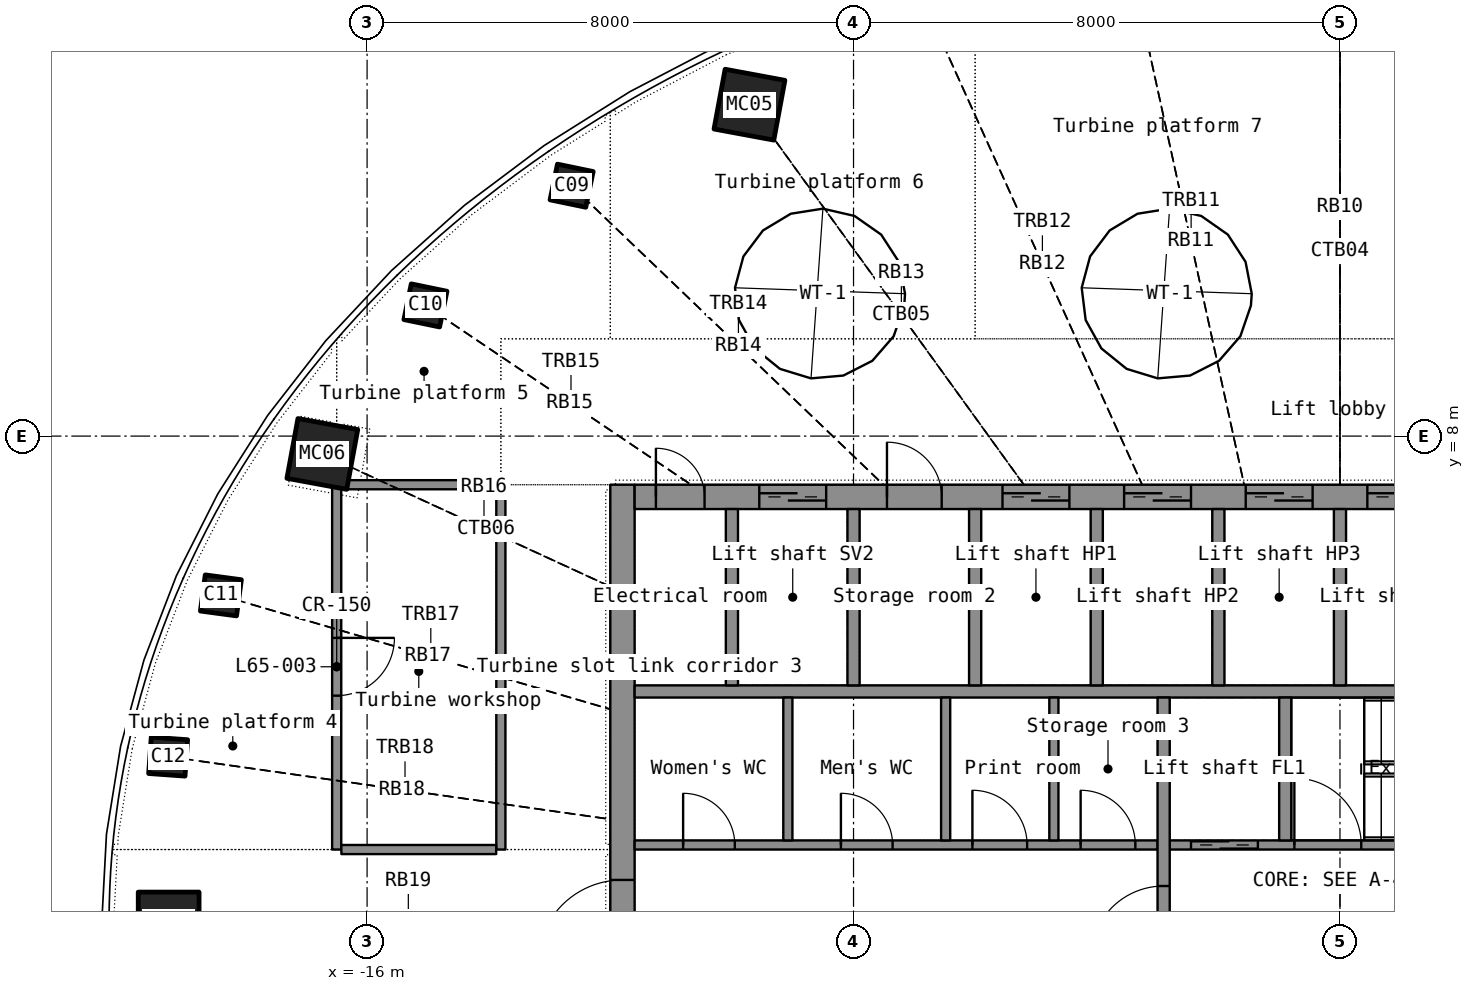
"""IFC4 building model, lengths in metres.
Left out: names, types, materials, properties, quantities, classifications, styles, units other than length and angle.
Written with IfcOpenShell. Run it as: python <this file> out.ifc"""

import sys

from ifc_helpers import new_model, si_unit, direction, frame, frame_2d, origin, origin_2d, place, context, subcontext, project, spatial, rectangle, hollow_rectangle, extrude, element, fill, save


model = new_model("IFC4")
c1 = context("Model", 3, precision=1e-05, world=origin(), true_north=direction((0.0, 1.0)))
c2 = subcontext(c1, "Body", "Model", "MODEL_VIEW")
j1 = project(units=[si_unit("LENGTHUNIT", "METRE"), si_unit("PLANEANGLEUNIT", "RADIAN")], contexts=[c1])
p1 = place(None, origin())
s1 = spatial("IfcSite", under=j1, at=p1, CompositionType="ELEMENT")
p2 = place(p1, origin())
s2 = spatial("IfcBuilding", under=s1, at=p2, CompositionType="ELEMENT")
p3 = place(p2, frame((0.0, 0.0, 265.2)))
s3 = spatial("IfcBuildingStorey", under=s2, at=p3, CompositionType="ELEMENT", Elevation=265.2)
p4 = place(p3, frame((-9.711, 13.451, 0.0), z_axis=(0.017279668, -0.02453449, 0.999549635), x_axis=(0.908911912, 0.416952184, -0.005478454)))
e1 = element("IfcColumn", 1, at=p4, inside=s3, PredefinedType="COLUMN", context=c2, shape_type="SweptSolid", body=[
    extrude(hollow_rectangle(XDim=1.0, YDim=1.0, WallThickness=0.032, at=origin_2d()), origin(), (0.0, 0.0, 1.0), 7.404),
])
p5 = place(p3, frame((-12.636, 12.118, 0.0), z_axis=(0.022225407, -0.021730776, 0.999516786), x_axis=(0.829477504, 0.558504573, -0.006301782)))
e2 = element("IfcColumn", 2, at=p5, inside=s3, PredefinedType="COLUMN", context=c2, shape_type="SweptSolid", body=[
    extrude(hollow_rectangle(XDim=0.6, YDim=0.6, WallThickness=0.025, at=origin_2d()), origin(), (0.0, 0.0, 1.0), 7.404),
])
p6 = place(p3, frame((-15.041, 10.149, 0.0), z_axis=(0.026511305, -0.018201791, 0.999482789), x_axis=(0.721084308, 0.692816746, -0.006509747)))
e3 = element("IfcColumn", 3, at=p6, inside=s3, PredefinedType="COLUMN", context=c2, shape_type="SweptSolid", body=[
    extrude(hollow_rectangle(XDim=0.6, YDim=0.6, WallThickness=0.025, at=origin_2d()), origin(), (0.0, 0.0, 1.0), 7.404),
])
p7 = place(p3, frame((-16.736, 7.706, 0.0), z_axis=(0.02993968, -0.014178483, 0.999451142), x_axis=(0.58479336, 0.811160032, -0.006010807)))
e4 = element("IfcColumn", 4, at=p7, inside=s3, PredefinedType="COLUMN", context=c2, shape_type="SweptSolid", body=[
    extrude(hollow_rectangle(XDim=1.0, YDim=1.0, WallThickness=0.032, at=origin_2d()), origin(), (0.0, 0.0, 1.0), 7.404),
])
p8 = place(p3, frame((-18.404, 5.38, 0.0), z_axis=(0.032477793, -0.009660907, 0.999425765), x_axis=(0.410307078, 0.911936229, -0.004518332)))
e5 = element("IfcColumn", 5, at=p8, inside=s3, PredefinedType="COLUMN", context=c2, shape_type="SweptSolid", body=[
    extrude(hollow_rectangle(XDim=0.6, YDim=0.6, WallThickness=0.025, at=origin_2d()), origin(), (0.0, 0.0, 1.0), 7.404),
])
p9 = place(p3, frame((-19.272, 2.728, 0.0), z_axis=(0.034059852, -0.004912796, 0.99940772), x_axis=(0.21296706, 0.977056295, -0.002455003)))
e6 = element("IfcColumn", 6, at=p9, inside=s3, PredefinedType="COLUMN", context=c2, shape_type="SweptSolid", body=[
    extrude(hollow_rectangle(XDim=0.6, YDim=0.6, WallThickness=0.025, at=origin_2d()), origin(), (0.0, 0.0, 1.0), 7.405),
])
p10 = place(p3, frame((-19.263, 0.0, 0.0), z_axis=(0.034587192, 0.0, 0.999401684), x_axis=(0.0, 1.0, 0.0)))
e7 = element("IfcColumn", 7, at=p10, inside=s3, PredefinedType="COLUMN", context=c2, shape_type="SweptSolid", body=[
    extrude(hollow_rectangle(XDim=1.0, YDim=1.0, WallThickness=0.032, at=origin_2d()), origin(), (0.0, 0.0, 1.0), 7.405),
])
p11 = place(p3, frame((-11.8, -7.2, 0.0), z_axis=(0.0, 0.0, 1.0), x_axis=(0.0, 1.0, 0.0)))
e8 = element("IfcWall", 8, at=p11, inside=s3, PredefinedType="SHEAR", context=c2, shape_type="SweptSolid", body=[
    extrude(rectangle(XDim=14.4, YDim=0.4, at=frame_2d((7.2, 0.0))), origin(), (0.0, 0.0, 1.0), 6.9),
])
p12 = place(p11, frame((6.5, 0.0, 0.0)))
e9 = element("IfcOpeningElement", 9, at=p12, cuts=e8, PredefinedType="OPENING", context=c2, shape_type="SweptSolid", body=[
    extrude(rectangle(XDim=1.4, YDim=2.2, at=frame_2d((0.7, 1.1))), frame((0.0, 0.21, 0.0), z_axis=(0.0, -1.0, 0.0), x_axis=(1.0, 0.0, 0.0)), (0.0, 0.0, 1.0), 0.42),
])
p13 = place(p3, frame((-11.6, 7.0, 0.0), z_axis=(0.0, 0.0, 1.0), x_axis=(1.0, 0.0, 0.0)))
e10 = element("IfcWall", 10, at=p13, inside=s3, PredefinedType="SHEAR", context=c2, shape_type="SweptSolid", body=[
    extrude(rectangle(XDim=23.2, YDim=0.4, at=frame_2d((11.6, 0.0))), origin(), (0.0, 0.0, 1.0), 6.9),
])
p14 = place(p13, frame((2.05, 0.0, 0.0)))
e11 = element("IfcOpeningElement", 11, at=p14, cuts=e10, PredefinedType="OPENING", context=c2, shape_type="SweptSolid", body=[
    extrude(rectangle(XDim=1.1, YDim=2.2, at=frame_2d((0.55, 1.1))), frame((0.0, 0.21, 0.0), z_axis=(0.0, -1.0, 0.0), x_axis=(1.0, 0.0, 0.0)), (0.0, 0.0, 1.0), 0.42),
])
p15 = place(p13, frame((6.05, 0.0, 0.0)))
e12 = element("IfcOpeningElement", 12, at=p15, cuts=e10, PredefinedType="OPENING", context=c2, shape_type="SweptSolid", body=[
    extrude(rectangle(XDim=1.1, YDim=2.2, at=frame_2d((0.55, 1.1))), frame((0.0, 0.21, 0.0), z_axis=(0.0, -1.0, 0.0), x_axis=(1.0, 0.0, 0.0)), (0.0, 0.0, 1.0), 0.42),
])
p16 = place(p13, frame((8.05, 0.0, 0.0)))
e13 = element("IfcOpeningElement", 13, at=p16, cuts=e10, PredefinedType="OPENING", context=c2, shape_type="SweptSolid", body=[
    extrude(rectangle(XDim=1.1, YDim=2.2, at=frame_2d((0.55, 1.1))), frame((0.0, 0.21, 0.0), z_axis=(0.0, -1.0, 0.0), x_axis=(1.0, 0.0, 0.0)), (0.0, 0.0, 1.0), 0.42),
])
p17 = place(p13, frame((10.05, 0.0, 0.0)))
e14 = element("IfcOpeningElement", 14, at=p17, cuts=e10, PredefinedType="OPENING", context=c2, shape_type="SweptSolid", body=[
    extrude(rectangle(XDim=1.1, YDim=2.2, at=frame_2d((0.55, 1.1))), frame((0.0, 0.21, 0.0), z_axis=(0.0, -1.0, 0.0), x_axis=(1.0, 0.0, 0.0)), (0.0, 0.0, 1.0), 0.42),
])
p18 = place(p13, frame((12.05, 0.0, 0.0)))
e15 = element("IfcOpeningElement", 15, at=p18, cuts=e10, PredefinedType="OPENING", context=c2, shape_type="SweptSolid", body=[
    extrude(rectangle(XDim=1.1, YDim=2.2, at=frame_2d((0.55, 1.1))), frame((0.0, 0.21, 0.0), z_axis=(0.0, -1.0, 0.0), x_axis=(1.0, 0.0, 0.0)), (0.0, 0.0, 1.0), 0.42),
])
p19 = place(p13, frame((14.05, 0.0, 0.0)))
e16 = element("IfcOpeningElement", 16, at=p19, cuts=e10, PredefinedType="OPENING", context=c2, shape_type="SweptSolid", body=[
    extrude(rectangle(XDim=1.1, YDim=2.2, at=frame_2d((0.55, 1.1))), frame((0.0, 0.21, 0.0), z_axis=(0.0, -1.0, 0.0), x_axis=(1.0, 0.0, 0.0)), (0.0, 0.0, 1.0), 0.42),
])
p20 = place(p13, frame((16.05, 0.0, 0.0)))
e17 = element("IfcOpeningElement", 17, at=p20, cuts=e10, PredefinedType="OPENING", context=c2, shape_type="SweptSolid", body=[
    extrude(rectangle(XDim=1.1, YDim=2.2, at=frame_2d((0.55, 1.1))), frame((0.0, 0.21, 0.0), z_axis=(0.0, -1.0, 0.0), x_axis=(1.0, 0.0, 0.0)), (0.0, 0.0, 1.0), 0.42),
])
p21 = place(p13, frame((18.05, 0.0, 0.0)))
e18 = element("IfcOpeningElement", 18, at=p21, cuts=e10, PredefinedType="OPENING", context=c2, shape_type="SweptSolid", body=[
    extrude(rectangle(XDim=1.1, YDim=2.2, at=frame_2d((0.55, 1.1))), frame((0.0, 0.21, 0.0), z_axis=(0.0, -1.0, 0.0), x_axis=(1.0, 0.0, 0.0)), (0.0, 0.0, 1.0), 0.42),
])
p22 = place(p13, frame((20.05, 0.0, 0.0)))
e19 = element("IfcOpeningElement", 19, at=p22, cuts=e10, PredefinedType="OPENING", context=c2, shape_type="SweptSolid", body=[
    extrude(rectangle(XDim=1.1, YDim=2.2, at=frame_2d((0.55, 1.1))), frame((0.0, 0.21, 0.0), z_axis=(0.0, -1.0, 0.0), x_axis=(1.0, 0.0, 0.0)), (0.0, 0.0, 1.0), 0.42),
])
p23 = place(p13, frame((4.15, 0.0, 0.0)))
e20 = element("IfcOpeningElement", 20, at=p23, cuts=e10, PredefinedType="OPENING", context=c2, shape_type="SweptSolid", body=[
    extrude(rectangle(XDim=0.9, YDim=2.1, at=frame_2d((0.45, 1.05))), frame((0.0, 0.21, 0.0), z_axis=(0.0, -1.0, 0.0), x_axis=(1.0, 0.0, 0.0)), (0.0, 0.0, 1.0), 0.42),
])
p24 = place(p13, frame((0.35, 0.0, 0.0)))
e21 = element("IfcOpeningElement", 21, at=p24, cuts=e10, PredefinedType="OPENING", context=c2, shape_type="SweptSolid", body=[
    extrude(rectangle(XDim=0.8, YDim=2.05, at=frame_2d((0.4, 1.025))), frame((0.0, 0.21, 0.0), z_axis=(0.0, -1.0, 0.0), x_axis=(1.0, 0.0, 0.0)), (0.0, 0.0, 1.0), 0.42),
])
p25 = place(p13, frame((22.05, 0.0, 0.0)))
e22 = element("IfcOpeningElement", 22, at=p25, cuts=e10, PredefinedType="OPENING", context=c2, shape_type="SweptSolid", body=[
    extrude(rectangle(XDim=0.8, YDim=2.05, at=frame_2d((0.4, 1.025))), frame((0.0, 0.21, 0.0), z_axis=(0.0, -1.0, 0.0), x_axis=(1.0, 0.0, 0.0)), (0.0, 0.0, 1.0), 0.42),
])
p26 = place(p3, frame((-11.6, 3.8, 0.0), z_axis=(0.0, 0.0, 1.0), x_axis=(1.0, 0.0, 0.0)))
e23 = element("IfcWall", 23, at=p26, inside=s3, PredefinedType="SHEAR", context=c2, shape_type="SweptSolid", body=[
    extrude(rectangle(XDim=23.2, YDim=0.2, at=frame_2d((11.6, 0.0))), origin(), (0.0, 0.0, 1.0), 6.9),
])
for number, where, z_axis, x_axis in (
    (24, (-10.0, 3.9, 0.0), (0.0, 0.0, 1.0), (0.0, 1.0, 0.0)),
    (25, (-8.0, 3.9, 0.0), (0.0, 0.0, 1.0), (0.0, 1.0, 0.0)),
    (26, (-6.0, 3.9, 0.0), (0.0, 0.0, 1.0), (0.0, 1.0, 0.0)),
    (27, (-4.0, 3.9, 0.0), (0.0, 0.0, 1.0), (0.0, 1.0, 0.0)),
    (28, (-2.0, 3.9, 0.0), (0.0, 0.0, 1.0), (0.0, 1.0, 0.0)),
    (29, (0.0, 3.9, 0.0), (0.0, 0.0, 1.0), (0.0, 1.0, 0.0)),
):
    element("IfcWall", number, at=place(p3, frame(where, z_axis=z_axis, x_axis=x_axis)), inside=s3, PredefinedType="SHEAR", context=c2, shape_type="SweptSolid", body=[
        extrude(rectangle(XDim=2.9, YDim=0.2, at=frame_2d((1.45, 0.0))), origin(), (0.0, 0.0, 1.0), 6.9),
    ])
p27 = place(p3, frame((-11.6, 1.275, 0.0), z_axis=(0.0, 0.0, 1.0), x_axis=(1.0, 0.0, 0.0)))
e30 = element("IfcWall", 30, at=p27, inside=s3, PredefinedType="PARTITIONING", context=c2, shape_type="SweptSolid", body=[
    extrude(rectangle(XDim=8.6, YDim=0.15, at=frame_2d((4.3, 0.0))), origin(), (0.0, 0.0, 1.0), 6.9),
])
p28 = place(p27, frame((0.798, 0.0, 0.0)))
e31 = element("IfcOpeningElement", 31, at=p28, cuts=e30, PredefinedType="OPENING", context=c2, shape_type="SweptSolid", body=[
    extrude(rectangle(XDim=0.85, YDim=2.1, at=frame_2d((0.425, 1.05))), frame((0.0, 0.085, 0.0), z_axis=(0.0, -1.0, 0.0), x_axis=(1.0, 0.0, 0.0)), (0.0, 0.0, 1.0), 0.17),
])
p29 = place(p27, frame((3.393, 0.0, 0.0)))
e32 = element("IfcOpeningElement", 32, at=p29, cuts=e30, PredefinedType="OPENING", context=c2, shape_type="SweptSolid", body=[
    extrude(rectangle(XDim=0.85, YDim=2.1, at=frame_2d((0.425, 1.05))), frame((0.0, 0.085, 0.0), z_axis=(0.0, -1.0, 0.0), x_axis=(1.0, 0.0, 0.0)), (0.0, 0.0, 1.0), 0.17),
])
p30 = place(p27, frame((5.555, 0.0, 0.0)))
e33 = element("IfcOpeningElement", 33, at=p30, cuts=e30, PredefinedType="OPENING", context=c2, shape_type="SweptSolid", body=[
    extrude(rectangle(XDim=0.9, YDim=2.1, at=frame_2d((0.45, 1.05))), frame((0.0, 0.085, 0.0), z_axis=(0.0, -1.0, 0.0), x_axis=(1.0, 0.0, 0.0)), (0.0, 0.0, 1.0), 0.17),
])
p31 = place(p27, frame((7.335, 0.0, 0.0)))
e34 = element("IfcOpeningElement", 34, at=p31, cuts=e30, PredefinedType="OPENING", context=c2, shape_type="SweptSolid", body=[
    extrude(rectangle(XDim=0.9, YDim=2.1, at=frame_2d((0.45, 1.05))), frame((0.0, 0.085, 0.0), z_axis=(0.0, -1.0, 0.0), x_axis=(1.0, 0.0, 0.0)), (0.0, 0.0, 1.0), 0.17),
])
p32 = place(p3, frame((-2.8, 1.275, 0.0), z_axis=(0.0, 0.0, 1.0), x_axis=(1.0, 0.0, 0.0)))
e35 = element("IfcWall", 35, at=p32, inside=s3, PredefinedType="SHEAR", context=c2, shape_type="SweptSolid", body=[
    extrude(rectangle(XDim=5.6, YDim=0.15, at=frame_2d((2.8, 0.0))), origin(), (0.0, 0.0, 1.0), 6.9),
])
p33 = place(p32, frame((0.35, 0.0, 0.0)))
e36 = element("IfcOpeningElement", 36, at=p33, cuts=e35, PredefinedType="OPENING", context=c2, shape_type="SweptSolid", body=[
    extrude(rectangle(XDim=1.1, YDim=2.2, at=frame_2d((0.55, 1.1))), frame((0.0, 0.085, 0.0), z_axis=(0.0, -1.0, 0.0), x_axis=(1.0, 0.0, 0.0)), (0.0, 0.0, 1.0), 0.17),
])
p34 = place(p32, frame((2.05, 0.0, 0.0)))
e37 = element("IfcOpeningElement", 37, at=p34, cuts=e35, PredefinedType="OPENING", context=c2, shape_type="SweptSolid", body=[
    extrude(rectangle(XDim=1.1, YDim=2.15, at=frame_2d((0.55, 1.075))), frame((0.0, 0.085, 0.0), z_axis=(0.0, -1.0, 0.0), x_axis=(1.0, 0.0, 0.0)), (0.0, 0.0, 1.0), 0.17),
])
p35 = place(p3, frame((-2.9, -1.35, 0.0), z_axis=(0.0, 0.0, 1.0), x_axis=(0.0, 1.0, 0.0)))
e38 = element("IfcWall", 38, at=p35, inside=s3, PredefinedType="SHEAR", context=c2, shape_type="SweptSolid", body=[
    extrude(rectangle(XDim=5.05, YDim=0.2, at=frame_2d((2.525, 0.0))), origin(), (0.0, 0.0, 1.0), 6.9),
])
p36 = place(p35, frame((0.75, 0.0, 0.0)))
e39 = element("IfcOpeningElement", 39, at=p36, cuts=e38, PredefinedType="OPENING", context=c2, shape_type="SweptSolid", body=[
    extrude(rectangle(XDim=1.2, YDim=2.2, at=frame_2d((0.6, 1.1))), frame((0.0, 0.11, 0.0), z_axis=(0.0, -1.0, 0.0), x_axis=(1.0, 0.0, 0.0)), (0.0, 0.0, 1.0), 0.22),
])
p37 = place(p3, frame((-0.9, 1.35, 0.0), z_axis=(0.0, 0.0, 1.0), x_axis=(0.0, 1.0, 0.0)))
e40 = element("IfcWall", 40, at=p37, inside=s3, PredefinedType="SHEAR", context=c2, shape_type="SweptSolid", body=[
    extrude(rectangle(XDim=2.35, YDim=0.2, at=frame_2d((1.175, 0.0))), origin(), (0.0, 0.0, 1.0), 6.9),
])
for number, where, z_axis, x_axis in (
    (41, (-9.08, 1.35, 0.0), (0.0, 0.0, 1.0), (0.0, 1.0, 0.0)),
    (42, (-6.485, 1.35, 0.0), (0.0, 0.0, 1.0), (0.0, 1.0, 0.0)),
    (43, (-4.705, 1.35, 0.0), (0.0, 0.0, 1.0), (0.0, 1.0, 0.0)),
):
    element("IfcWall", number, at=place(p3, frame(where, z_axis=z_axis, x_axis=x_axis)), inside=s3, PredefinedType="PARTITIONING", context=c2, shape_type="SweptSolid", body=[
        extrude(rectangle(XDim=2.35, YDim=0.15, at=frame_2d((1.175, 0.0))), origin(), (0.0, 0.0, 1.0), 6.9),
    ])
p38 = place(p3, frame((-16.5, 7.212, 0.0), z_axis=(0.0, 0.0, 1.0), x_axis=(0.0, -1.0, 0.0)))
e44 = element("IfcWall", 44, at=p38, inside=s3, PredefinedType="PARTITIONING", context=c2, shape_type="SweptSolid", body=[
    extrude(rectangle(XDim=6.012, YDim=0.15, at=frame_2d((3.006, 0.0))), origin(), (0.0, 0.0, 1.0), 6.1),
])
p39 = place(p38, frame((2.531, 0.0, 0.0)))
e45 = element("IfcOpeningElement", 45, at=p39, cuts=e44, PredefinedType="OPENING", context=c2, shape_type="SweptSolid", body=[
    extrude(rectangle(XDim=0.95, YDim=2.15, at=frame_2d((0.475, 1.075))), frame((0.0, 0.085, 0.0), z_axis=(0.0, -1.0, 0.0), x_axis=(1.0, 0.0, 0.0)), (0.0, 0.0, 1.0), 0.17),
])
p40 = place(p3, frame((-13.8, 7.2, 0.0), z_axis=(0.0, 0.0, 1.0), x_axis=(0.0, -1.0, 0.0)))
e46 = element("IfcWall", 46, at=p40, inside=s3, PredefinedType="PARTITIONING", context=c2, shape_type="SweptSolid", body=[
    extrude(rectangle(XDim=6.0, YDim=0.15, at=frame_2d((3.0, 0.0))), origin(), (0.0, 0.0, 1.0), 6.1),
])
for number, where, z_axis, x_axis in (
    (47, (-13.877, 1.2, 0.0), (0.0, 0.0, 1.0), (-1.0, 0.0, 0.0)),
    (48, (-13.877, 7.2, 0.0), (0.0, 0.0, 1.0), (-1.0, 0.0, 0.0)),
):
    element("IfcWall", number, at=place(p3, frame(where, z_axis=z_axis, x_axis=x_axis)), inside=s3, PredefinedType="PARTITIONING", context=c2, shape_type="SweptSolid", body=[
        extrude(rectangle(XDim=2.546, YDim=0.15, at=frame_2d((1.273, 0.0))), origin(), (0.0, 0.0, 1.0), 6.1),
    ])
p41 = place(p14, origin())
e49 = element("IfcDoor", 49, at=p41, inside=s3, OperationType="DOUBLE_DOOR_SLIDING", PredefinedType="DOOR", context=c2, shape_type="SweptSolid", body=[
    extrude(rectangle(XDim=1.1, YDim=2.2, at=frame_2d((0.55, 1.1))), frame((0.0, 0.025, 0.0), z_axis=(0.0, -1.0, 0.0), x_axis=(1.0, 0.0, 0.0)), (0.0, 0.0, 1.0), 0.05),
])
fill(e11, e49)
p42 = place(p15, origin())
e50 = element("IfcDoor", 50, at=p42, inside=s3, OperationType="DOUBLE_DOOR_SLIDING", PredefinedType="DOOR", context=c2, shape_type="SweptSolid", body=[
    extrude(rectangle(XDim=1.1, YDim=2.2, at=frame_2d((0.55, 1.1))), frame((0.0, 0.025, 0.0), z_axis=(0.0, -1.0, 0.0), x_axis=(1.0, 0.0, 0.0)), (0.0, 0.0, 1.0), 0.05),
])
fill(e12, e50)
p43 = place(p16, origin())
e51 = element("IfcDoor", 51, at=p43, inside=s3, OperationType="DOUBLE_DOOR_SLIDING", PredefinedType="DOOR", context=c2, shape_type="SweptSolid", body=[
    extrude(rectangle(XDim=1.1, YDim=2.2, at=frame_2d((0.55, 1.1))), frame((0.0, 0.025, 0.0), z_axis=(0.0, -1.0, 0.0), x_axis=(1.0, 0.0, 0.0)), (0.0, 0.0, 1.0), 0.05),
])
fill(e13, e51)
p44 = place(p17, origin())
e52 = element("IfcDoor", 52, at=p44, inside=s3, OperationType="DOUBLE_DOOR_SLIDING", PredefinedType="DOOR", context=c2, shape_type="SweptSolid", body=[
    extrude(rectangle(XDim=1.1, YDim=2.2, at=frame_2d((0.55, 1.1))), frame((0.0, 0.025, 0.0), z_axis=(0.0, -1.0, 0.0), x_axis=(1.0, 0.0, 0.0)), (0.0, 0.0, 1.0), 0.05),
])
fill(e14, e52)
p45 = place(p18, origin())
e53 = element("IfcDoor", 53, at=p45, inside=s3, OperationType="DOUBLE_DOOR_SLIDING", PredefinedType="DOOR", context=c2, shape_type="SweptSolid", body=[
    extrude(rectangle(XDim=1.1, YDim=2.2, at=frame_2d((0.55, 1.1))), frame((0.0, 0.025, 0.0), z_axis=(0.0, -1.0, 0.0), x_axis=(1.0, 0.0, 0.0)), (0.0, 0.0, 1.0), 0.05),
])
fill(e15, e53)
p46 = place(p23, origin())
e54 = element("IfcDoor", 54, at=p46, inside=s3, OperationType="SINGLE_SWING_LEFT", PredefinedType="DOOR", context=c2, shape_type="SweptSolid", body=[
    extrude(rectangle(XDim=0.9, YDim=2.1, at=frame_2d((0.45, 1.05))), frame((0.0, 0.025, 0.0), z_axis=(0.0, -1.0, 0.0), x_axis=(1.0, 0.0, 0.0)), (0.0, 0.0, 1.0), 0.05),
])
fill(e20, e54)
p47 = place(p24, origin())
e55 = element("IfcDoor", 55, at=p47, inside=s3, OperationType="SINGLE_SWING_LEFT", PredefinedType="DOOR", context=c2, shape_type="SweptSolid", body=[
    extrude(rectangle(XDim=0.8, YDim=2.05, at=frame_2d((0.4, 1.025))), frame((0.0, 0.025, 0.0), z_axis=(0.0, -1.0, 0.0), x_axis=(1.0, 0.0, 0.0)), (0.0, 0.0, 1.0), 0.05),
])
fill(e21, e55)
p48 = place(p12, origin())
e56 = element("IfcDoor", 56, at=p48, inside=s3, OperationType="DOUBLE_DOOR_SINGLE_SWING", PredefinedType="DOOR", context=c2, shape_type="SweptSolid", body=[
    extrude(rectangle(XDim=1.4, YDim=2.2, at=frame_2d((0.7, 1.1))), frame((0.0, 0.025, 0.0), z_axis=(0.0, -1.0, 0.0), x_axis=(1.0, 0.0, 0.0)), (0.0, 0.0, 1.0), 0.05),
])
fill(e9, e56)
p49 = place(p36, origin())
e57 = element("IfcDoor", 57, at=p49, inside=s3, OperationType="SINGLE_SWING_LEFT", PredefinedType="DOOR", context=c2, shape_type="SweptSolid", body=[
    extrude(rectangle(XDim=1.2, YDim=2.2, at=frame_2d((0.6, 1.1))), frame((0.0, 0.025, 0.0), z_axis=(0.0, -1.0, 0.0), x_axis=(1.0, 0.0, 0.0)), (0.0, 0.0, 1.0), 0.05),
])
fill(e39, e57)
p50 = place(p33, origin())
e58 = element("IfcDoor", 58, at=p50, inside=s3, OperationType="DOUBLE_DOOR_SLIDING", PredefinedType="DOOR", context=c2, shape_type="SweptSolid", body=[
    extrude(rectangle(XDim=1.1, YDim=2.2, at=frame_2d((0.55, 1.1))), frame((0.0, 0.025, 0.0), z_axis=(0.0, -1.0, 0.0), x_axis=(1.0, 0.0, 0.0)), (0.0, 0.0, 1.0), 0.05),
])
fill(e36, e58)
p51 = place(p28, origin())
e59 = element("IfcDoor", 59, at=p51, inside=s3, OperationType="SINGLE_SWING_LEFT", PredefinedType="DOOR", context=c2, shape_type="SweptSolid", body=[
    extrude(rectangle(XDim=0.85, YDim=2.1, at=frame_2d((0.425, 1.05))), frame((0.0, 0.025, 0.0), z_axis=(0.0, -1.0, 0.0), x_axis=(1.0, 0.0, 0.0)), (0.0, 0.0, 1.0), 0.05),
])
fill(e31, e59)
p52 = place(p29, origin())
e60 = element("IfcDoor", 60, at=p52, inside=s3, OperationType="SINGLE_SWING_LEFT", PredefinedType="DOOR", context=c2, shape_type="SweptSolid", body=[
    extrude(rectangle(XDim=0.85, YDim=2.1, at=frame_2d((0.425, 1.05))), frame((0.0, 0.025, 0.0), z_axis=(0.0, -1.0, 0.0), x_axis=(1.0, 0.0, 0.0)), (0.0, 0.0, 1.0), 0.05),
])
fill(e32, e60)
p53 = place(p30, origin())
e61 = element("IfcDoor", 61, at=p53, inside=s3, OperationType="SINGLE_SWING_LEFT", PredefinedType="DOOR", context=c2, shape_type="SweptSolid", body=[
    extrude(rectangle(XDim=0.9, YDim=2.1, at=frame_2d((0.45, 1.05))), frame((0.0, 0.025, 0.0), z_axis=(0.0, -1.0, 0.0), x_axis=(1.0, 0.0, 0.0)), (0.0, 0.0, 1.0), 0.05),
])
fill(e33, e61)
p54 = place(p31, origin())
e62 = element("IfcDoor", 62, at=p54, inside=s3, OperationType="SINGLE_SWING_LEFT", PredefinedType="DOOR", context=c2, shape_type="SweptSolid", body=[
    extrude(rectangle(XDim=0.9, YDim=2.1, at=frame_2d((0.45, 1.05))), frame((0.0, 0.025, 0.0), z_axis=(0.0, -1.0, 0.0), x_axis=(1.0, 0.0, 0.0)), (0.0, 0.0, 1.0), 0.05),
])
fill(e34, e62)
p55 = place(p34, origin())
e63 = element("IfcDoor", 63, at=p55, inside=s3, OperationType="SINGLE_SWING_LEFT", PredefinedType="DOOR", context=c2, shape_type="SweptSolid", body=[
    extrude(rectangle(XDim=1.1, YDim=2.15, at=frame_2d((0.55, 1.075))), frame((0.0, 0.025, 0.0), z_axis=(0.0, -1.0, 0.0), x_axis=(1.0, 0.0, 0.0)), (0.0, 0.0, 1.0), 0.05),
])
fill(e37, e63)
p56 = place(p39, origin())
e64 = element("IfcDoor", 64, at=p56, inside=s3, OperationType="SINGLE_SWING_LEFT", PredefinedType="DOOR", context=c2, shape_type="SweptSolid", body=[
    extrude(rectangle(XDim=0.95, YDim=2.15, at=frame_2d((0.475, 1.075))), frame((0.0, 0.025, 0.0), z_axis=(0.0, -1.0, 0.0), x_axis=(1.0, 0.0, 0.0)), (0.0, 0.0, 1.0), 0.05),
])
fill(e45, e64)
save(model, sys.argv[1])
